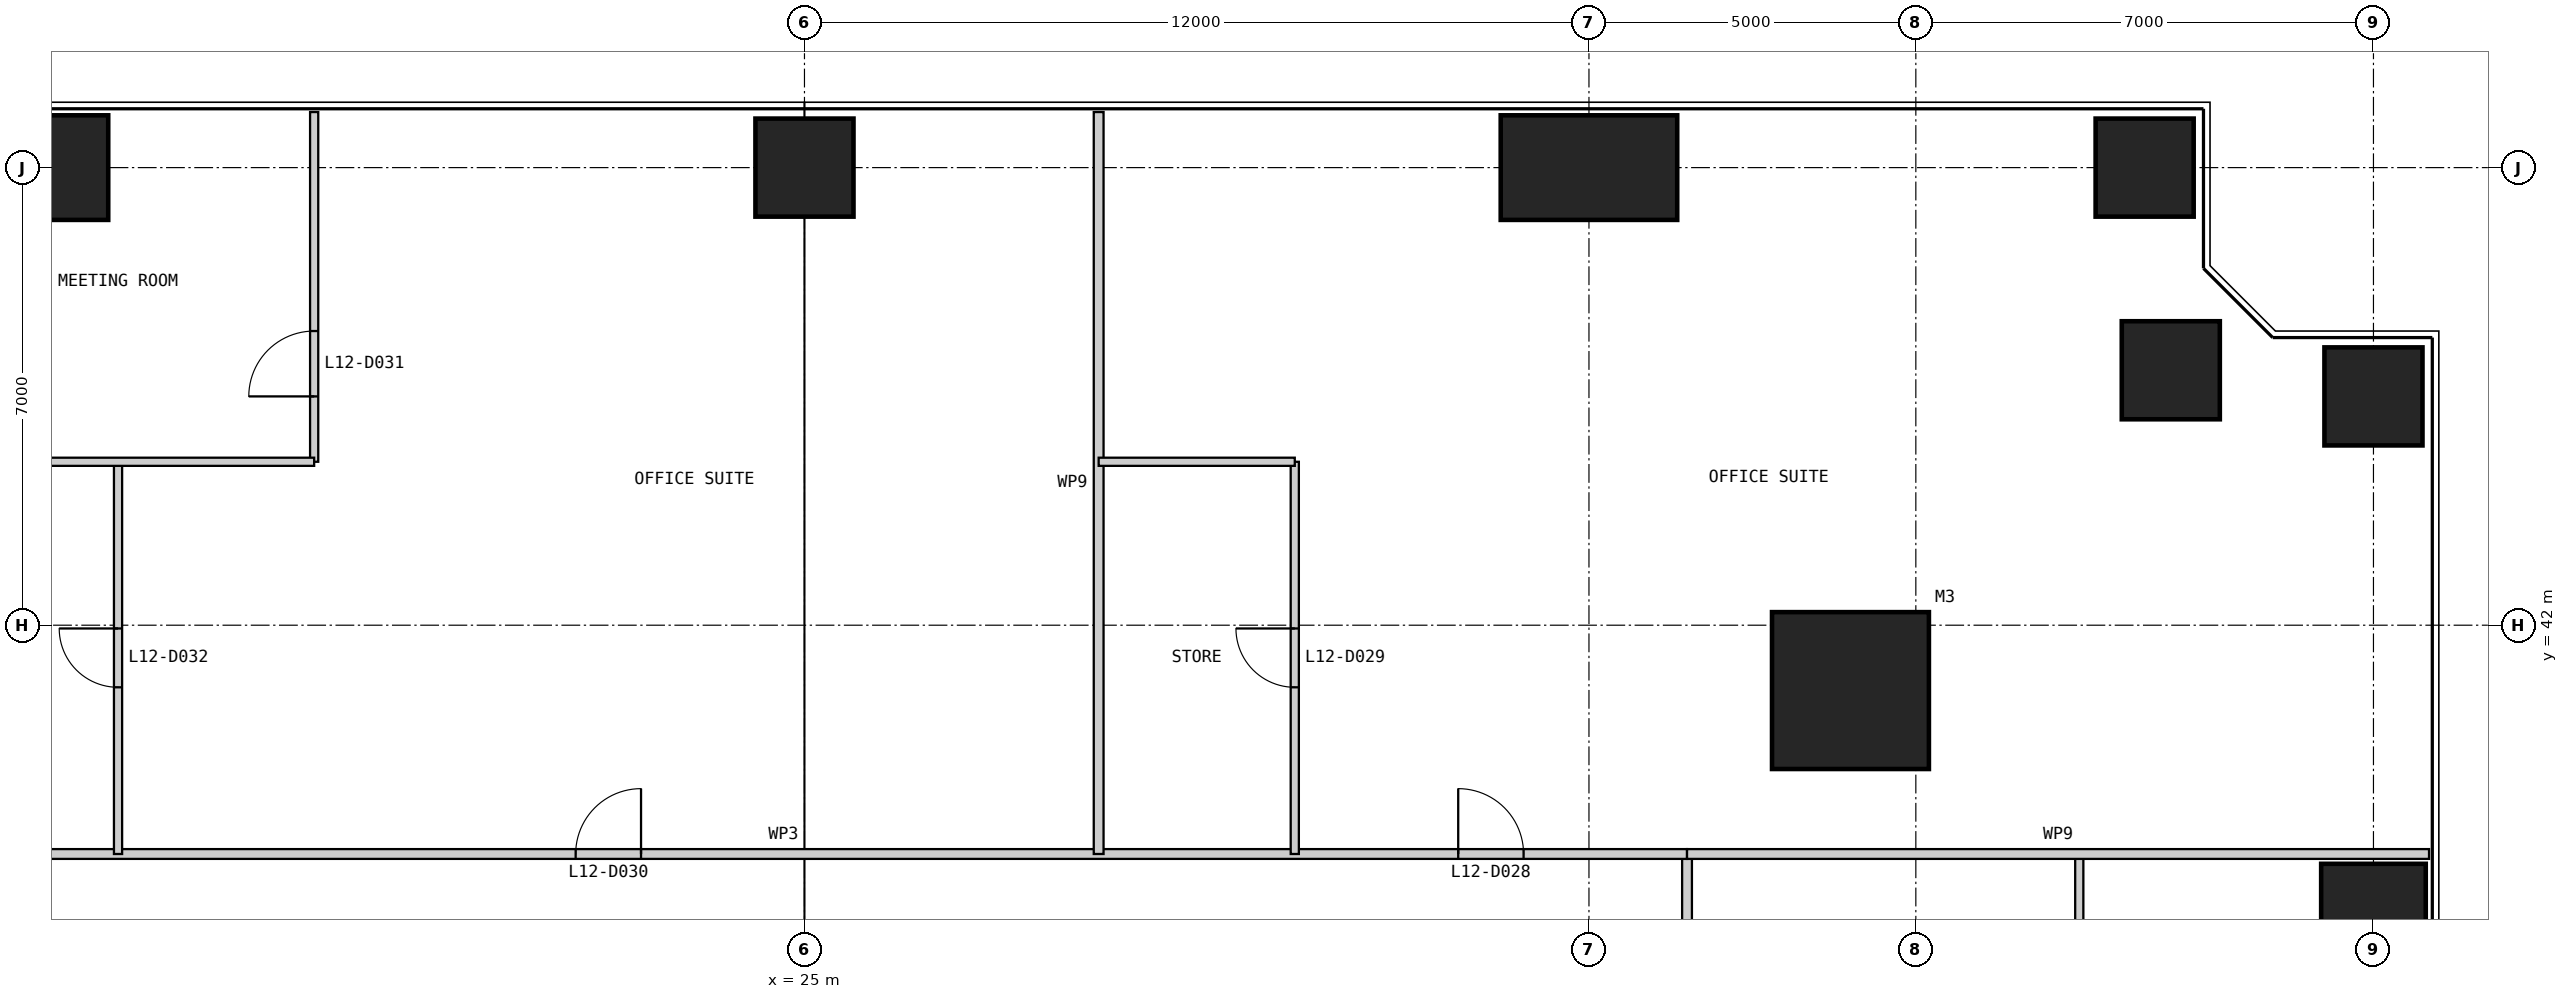
"""IFC4 building model, lengths in metres.
Left out: names, types, materials, properties, quantities, classifications, styles, units other than length and angle.
Written with IfcOpenShell. Run it as: python <this file> out.ifc"""

import sys

from ifc_helpers import new_model, si_unit, direction, frame, frame_2d, origin, origin_2d, place, context, subcontext, project, spatial, rectangle, extrude, element, fill, save


model = new_model("IFC4")
c1 = context("Model", 3, precision=1e-05, world=origin(), true_north=direction((0.0, 1.0)))
c2 = subcontext(c1, "Body", "Model", "MODEL_VIEW")
j1 = project(units=[si_unit("LENGTHUNIT", "METRE"), si_unit("PLANEANGLEUNIT", "RADIAN")], contexts=[c1])
p1 = place(None, origin())
s1 = spatial("IfcSite", under=j1, at=p1, CompositionType="ELEMENT")
p2 = place(p1, origin())
s2 = spatial("IfcBuilding", under=s1, at=p2, CompositionType="ELEMENT")
p3 = place(p2, frame((0.0, 0.0, 55.0)))
s3 = spatial("IfcBuildingStorey", under=s2, at=p3, CompositionType="ELEMENT", Elevation=55.0)
p4 = place(p3, frame((41.0, 41.0, 0.0), z_axis=(0.0, 0.0, 1.0), x_axis=(1.0, 0.0, 0.0)))
e1 = element("IfcColumn", 1, at=p4, inside=s3, PredefinedType="COLUMN", context=c2, shape_type="SweptSolid", body=[
    extrude(rectangle(XDim=2.4, YDim=2.4, at=origin_2d()), origin(), (0.0, 0.0, 1.0), 4.0),
])
p5 = place(p3, frame((49.0, 37.0, 0.0), z_axis=(0.0, 0.0, 1.0), x_axis=(1.0, 0.0, 0.0)))
e2 = element("IfcColumn", 2, at=p5, inside=s3, PredefinedType="COLUMN", context=c2, shape_type="SweptSolid", body=[
    extrude(rectangle(XDim=1.6, YDim=2.7, at=origin_2d()), origin(), (0.0, 0.0, 1.0), 4.0),
])
for number, where, z_axis, x_axis in (
    (3, (49.0, 45.5, 0.0), (0.0, 0.0, 1.0), (1.0, 0.0, 0.0)),
    (4, (45.9, 45.9, 0.0), (0.0, 0.0, 1.0), (1.0, 0.0, 0.0)),
    (5, (45.5, 49.0, 0.0), (0.0, 0.0, 1.0), (1.0, 0.0, 0.0)),
):
    element("IfcColumn", number, at=place(p3, frame(where, z_axis=z_axis, x_axis=x_axis)), inside=s3, PredefinedType="COLUMN", context=c2, shape_type="SweptSolid", body=[
        extrude(rectangle(XDim=1.5, YDim=1.5, at=origin_2d()), origin(), (0.0, 0.0, 1.0), 4.0),
    ])
p6 = place(p3, frame((37.0, 49.0, 0.0), z_axis=(0.0, 0.0, 1.0), x_axis=(1.0, 0.0, 0.0)))
e6 = element("IfcColumn", 6, at=p6, inside=s3, PredefinedType="COLUMN", context=c2, shape_type="SweptSolid", body=[
    extrude(rectangle(XDim=2.7, YDim=1.6, at=origin_2d()), origin(), (0.0, 0.0, 1.0), 4.0),
])
p7 = place(p3, frame((25.0, 49.0, 0.0), z_axis=(0.0, 0.0, 1.0), x_axis=(1.0, 0.0, 0.0)))
e7 = element("IfcColumn", 7, at=p7, inside=s3, PredefinedType="COLUMN", context=c2, shape_type="SweptSolid", body=[
    extrude(rectangle(XDim=1.5, YDim=1.5, at=origin_2d()), origin(), (0.0, 0.0, 1.0), 4.0),
])
p8 = place(p3, frame((13.0, 49.0, 0.0), z_axis=(0.0, 0.0, 1.0), x_axis=(1.0, 0.0, 0.0)))
e8 = element("IfcColumn", 8, at=p8, inside=s3, PredefinedType="COLUMN", context=c2, shape_type="SweptSolid", body=[
    extrude(rectangle(XDim=2.7, YDim=1.6, at=origin_2d()), origin(), (0.0, 0.0, 1.0), 4.0),
])
p9 = place(p3, frame((38.5, 11.5, 0.0), z_axis=(0.0, 0.0, 1.0), x_axis=(0.0, 1.0, 0.0)))
e9 = element("IfcWall", 9, at=p9, inside=s3, PredefinedType="PARTITIONING", context=c2, shape_type="SweptSolid", body=[
    extrude(rectangle(XDim=27.0, YDim=0.15, at=frame_2d((13.5, 0.0))), origin(), (0.0, 0.0, 1.0), 3.85),
])
p10 = place(p9, frame((2.5, 0.0, 0.0)))
e10 = element("IfcOpeningElement", 10, at=p10, cuts=e9, PredefinedType="OPENING", context=c2, shape_type="SweptSolid", body=[
    extrude(rectangle(XDim=1.0, YDim=2.2, at=frame_2d((0.5, 1.1))), frame((0.0, 0.085, 0.0), z_axis=(0.0, -1.0, 0.0), x_axis=(1.0, 0.0, 0.0)), (0.0, 0.0, 1.0), 0.17),
])
p11 = place(p9, frame((16.0, 0.0, 0.0)))
e11 = element("IfcOpeningElement", 11, at=p11, cuts=e9, PredefinedType="OPENING", context=c2, shape_type="SweptSolid", body=[
    extrude(rectangle(XDim=1.0, YDim=2.2, at=frame_2d((0.5, 1.1))), frame((0.0, 0.085, 0.0), z_axis=(0.0, -1.0, 0.0), x_axis=(1.0, 0.0, 0.0)), (0.0, 0.0, 1.0), 0.17),
])
p12 = place(p3, frame((44.5, 32.5, 0.0), z_axis=(0.0, 0.0, 1.0), x_axis=(0.0, 1.0, 0.0)))
e12 = element("IfcWall", 12, at=p12, inside=s3, PredefinedType="PARTITIONING", context=c2, shape_type="SweptSolid", body=[
    extrude(rectangle(XDim=6.0, YDim=0.125, at=frame_2d((3.0, 0.0))), origin(), (0.0, 0.0, 1.0), 3.85),
])
p13 = place(p3, frame((38.5, 38.5, 0.0), z_axis=(0.0, 0.0, 1.0), x_axis=(-1.0, 0.0, 0.0)))
e13 = element("IfcWall", 13, at=p13, inside=s3, PredefinedType="PARTITIONING", context=c2, shape_type="SweptSolid", body=[
    extrude(rectangle(XDim=27.0, YDim=0.15, at=frame_2d((13.5, 0.0))), origin(), (0.0, 0.0, 1.0), 3.85),
])
p14 = place(p13, frame((2.5, 0.0, 0.0)))
e14 = element("IfcOpeningElement", 14, at=p14, cuts=e13, PredefinedType="OPENING", context=c2, shape_type="SweptSolid", body=[
    extrude(rectangle(XDim=1.0, YDim=2.2, at=frame_2d((0.5, 1.1))), frame((0.0, 0.085, 0.0), z_axis=(0.0, -1.0, 0.0), x_axis=(1.0, 0.0, 0.0)), (0.0, 0.0, 1.0), 0.17),
])
p15 = place(p13, frame((16.0, 0.0, 0.0)))
e15 = element("IfcOpeningElement", 15, at=p15, cuts=e13, PredefinedType="OPENING", context=c2, shape_type="SweptSolid", body=[
    extrude(rectangle(XDim=1.0, YDim=2.2, at=frame_2d((0.5, 1.1))), frame((0.0, 0.085, 0.0), z_axis=(0.0, -1.0, 0.0), x_axis=(1.0, 0.0, 0.0)), (0.0, 0.0, 1.0), 0.17),
])
p16 = place(p3, frame((49.85, 38.5, 0.0), z_axis=(0.0, 0.0, 1.0), x_axis=(-1.0, 0.0, 0.0)))
e16 = element("IfcWall", 16, at=p16, inside=s3, PredefinedType="PARTITIONING", context=c2, shape_type="SweptSolid", body=[
    extrude(rectangle(XDim=11.35, YDim=0.15, at=frame_2d((5.675, 0.0))), origin(), (0.0, 0.0, 1.0), 3.85),
])
p17 = place(p3, frame((32.5, 44.5, 0.0), z_axis=(0.0, 0.0, 1.0), x_axis=(0.0, -1.0, 0.0)))
e17 = element("IfcWall", 17, at=p17, inside=s3, PredefinedType="PARTITIONING", context=c2, shape_type="SweptSolid", body=[
    extrude(rectangle(XDim=6.0, YDim=0.125, at=frame_2d((3.0, 0.0))), origin(), (0.0, 0.0, 1.0), 3.85),
])
p18 = place(p17, frame((2.55, 0.0, 0.0)))
e18 = element("IfcOpeningElement", 18, at=p18, cuts=e17, PredefinedType="OPENING", context=c2, shape_type="SweptSolid", body=[
    extrude(rectangle(XDim=0.9, YDim=2.2, at=frame_2d((0.45, 1.1))), frame((0.0, 0.073, 0.0), z_axis=(0.0, -1.0, 0.0), x_axis=(1.0, 0.0, 0.0)), (0.0, 0.0, 1.0), 0.145),
])
p19 = place(p3, frame((29.5, 49.85, 0.0), z_axis=(0.0, 0.0, 1.0), x_axis=(0.0, -1.0, 0.0)))
e19 = element("IfcWall", 19, at=p19, inside=s3, PredefinedType="PARTITIONING", context=c2, shape_type="SweptSolid", body=[
    extrude(rectangle(XDim=11.35, YDim=0.15, at=frame_2d((5.675, 0.0))), origin(), (0.0, 0.0, 1.0), 3.85),
])
p20 = place(p3, frame((17.5, 49.85, 0.0), z_axis=(0.0, 0.0, 1.0), x_axis=(0.0, -1.0, 0.0)))
e20 = element("IfcWall", 20, at=p20, inside=s3, PredefinedType="PARTITIONING", context=c2, shape_type="SweptSolid", body=[
    extrude(rectangle(XDim=5.35, YDim=0.125, at=frame_2d((2.675, 0.0))), origin(), (0.0, 0.0, 1.0), 3.85),
])
p21 = place(p20, frame((3.35, 0.0, 0.0)))
e21 = element("IfcOpeningElement", 21, at=p21, cuts=e20, PredefinedType="OPENING", context=c2, shape_type="SweptSolid", body=[
    extrude(rectangle(XDim=1.0, YDim=2.2, at=frame_2d((0.5, 1.1))), frame((0.0, 0.073, 0.0), z_axis=(0.0, -1.0, 0.0), x_axis=(1.0, 0.0, 0.0)), (0.0, 0.0, 1.0), 0.145),
])
p22 = place(p3, frame((14.5, 44.5, 0.0), z_axis=(0.0, 0.0, 1.0), x_axis=(0.0, -1.0, 0.0)))
e22 = element("IfcWall", 22, at=p22, inside=s3, PredefinedType="PARTITIONING", context=c2, shape_type="SweptSolid", body=[
    extrude(rectangle(XDim=6.0, YDim=0.125, at=frame_2d((3.0, 0.0))), origin(), (0.0, 0.0, 1.0), 3.85),
])
p23 = place(p22, frame((2.55, 0.0, 0.0)))
e23 = element("IfcOpeningElement", 23, at=p23, cuts=e22, PredefinedType="OPENING", context=c2, shape_type="SweptSolid", body=[
    extrude(rectangle(XDim=0.9, YDim=2.2, at=frame_2d((0.45, 1.1))), frame((0.0, 0.073, 0.0), z_axis=(0.0, -1.0, 0.0), x_axis=(1.0, 0.0, 0.0)), (0.0, 0.0, 1.0), 0.145),
])
p24 = place(p3, frame((32.5, 44.5, 0.0), z_axis=(0.0, 0.0, 1.0), x_axis=(-1.0, 0.0, 0.0)))
e24 = element("IfcWall", 24, at=p24, inside=s3, PredefinedType="PARTITIONING", context=c2, shape_type="SweptSolid", body=[
    extrude(rectangle(XDim=3.0, YDim=0.125, at=frame_2d((1.5, 0.0))), origin(), (0.0, 0.0, 1.0), 3.85),
])
p25 = place(p3, frame((17.5, 44.5, 0.0), z_axis=(0.0, 0.0, 1.0), x_axis=(-1.0, 0.0, 0.0)))
e25 = element("IfcWall", 25, at=p25, inside=s3, PredefinedType="PARTITIONING", context=c2, shape_type="SweptSolid", body=[
    extrude(rectangle(XDim=6.0, YDim=0.125, at=frame_2d((3.0, 0.0))), origin(), (0.0, 0.0, 1.0), 3.85),
])
p26 = place(p14, frame((1.0, 0.0, 0.0), z_axis=(0.0, 0.0, 1.0), x_axis=(-1.0, 0.0, 0.0)))
e26 = element("IfcDoor", 26, at=p26, inside=s3, OperationType="SINGLE_SWING_LEFT", PredefinedType="DOOR", context=c2, shape_type="SweptSolid", body=[
    extrude(rectangle(XDim=1.0, YDim=2.2, at=frame_2d((0.5, 1.1))), frame((0.0, 0.025, 0.0), z_axis=(0.0, -1.0, 0.0), x_axis=(1.0, 0.0, 0.0)), (0.0, 0.0, 1.0), 0.05),
])
fill(e14, e26)
p27 = place(p18, frame((0.9, 0.0, 0.0), z_axis=(0.0, 0.0, 1.0), x_axis=(-1.0, 0.0, 0.0)))
e27 = element("IfcDoor", 27, at=p27, inside=s3, OperationType="SINGLE_SWING_RIGHT", PredefinedType="DOOR", context=c2, shape_type="SweptSolid", body=[
    extrude(rectangle(XDim=0.9, YDim=2.2, at=frame_2d((0.45, 1.1))), frame((0.0, 0.025, 0.0), z_axis=(0.0, -1.0, 0.0), x_axis=(1.0, 0.0, 0.0)), (0.0, 0.0, 1.0), 0.05),
])
fill(e18, e27)
p28 = place(p15, frame((1.0, 0.0, 0.0), z_axis=(0.0, 0.0, 1.0), x_axis=(-1.0, 0.0, 0.0)))
e28 = element("IfcDoor", 28, at=p28, inside=s3, OperationType="SINGLE_SWING_RIGHT", PredefinedType="DOOR", context=c2, shape_type="SweptSolid", body=[
    extrude(rectangle(XDim=1.0, YDim=2.2, at=frame_2d((0.5, 1.1))), frame((0.0, 0.025, 0.0), z_axis=(0.0, -1.0, 0.0), x_axis=(1.0, 0.0, 0.0)), (0.0, 0.0, 1.0), 0.05),
])
fill(e15, e28)
p29 = place(p21, frame((1.0, 0.0, 0.0), z_axis=(0.0, 0.0, 1.0), x_axis=(-1.0, 0.0, 0.0)))
e29 = element("IfcDoor", 29, at=p29, inside=s3, OperationType="SINGLE_SWING_LEFT", PredefinedType="DOOR", context=c2, shape_type="SweptSolid", body=[
    extrude(rectangle(XDim=1.0, YDim=2.2, at=frame_2d((0.5, 1.1))), frame((0.0, 0.025, 0.0), z_axis=(0.0, -1.0, 0.0), x_axis=(1.0, 0.0, 0.0)), (0.0, 0.0, 1.0), 0.05),
])
fill(e21, e29)
p30 = place(p23, frame((0.9, 0.0, 0.0), z_axis=(0.0, 0.0, 1.0), x_axis=(-1.0, 0.0, 0.0)))
e30 = element("IfcDoor", 30, at=p30, inside=s3, OperationType="SINGLE_SWING_RIGHT", PredefinedType="DOOR", context=c2, shape_type="SweptSolid", body=[
    extrude(rectangle(XDim=0.9, YDim=2.2, at=frame_2d((0.45, 1.1))), frame((0.0, 0.025, 0.0), z_axis=(0.0, -1.0, 0.0), x_axis=(1.0, 0.0, 0.0)), (0.0, 0.0, 1.0), 0.05),
])
fill(e23, e30)
save(model, sys.argv[1])
